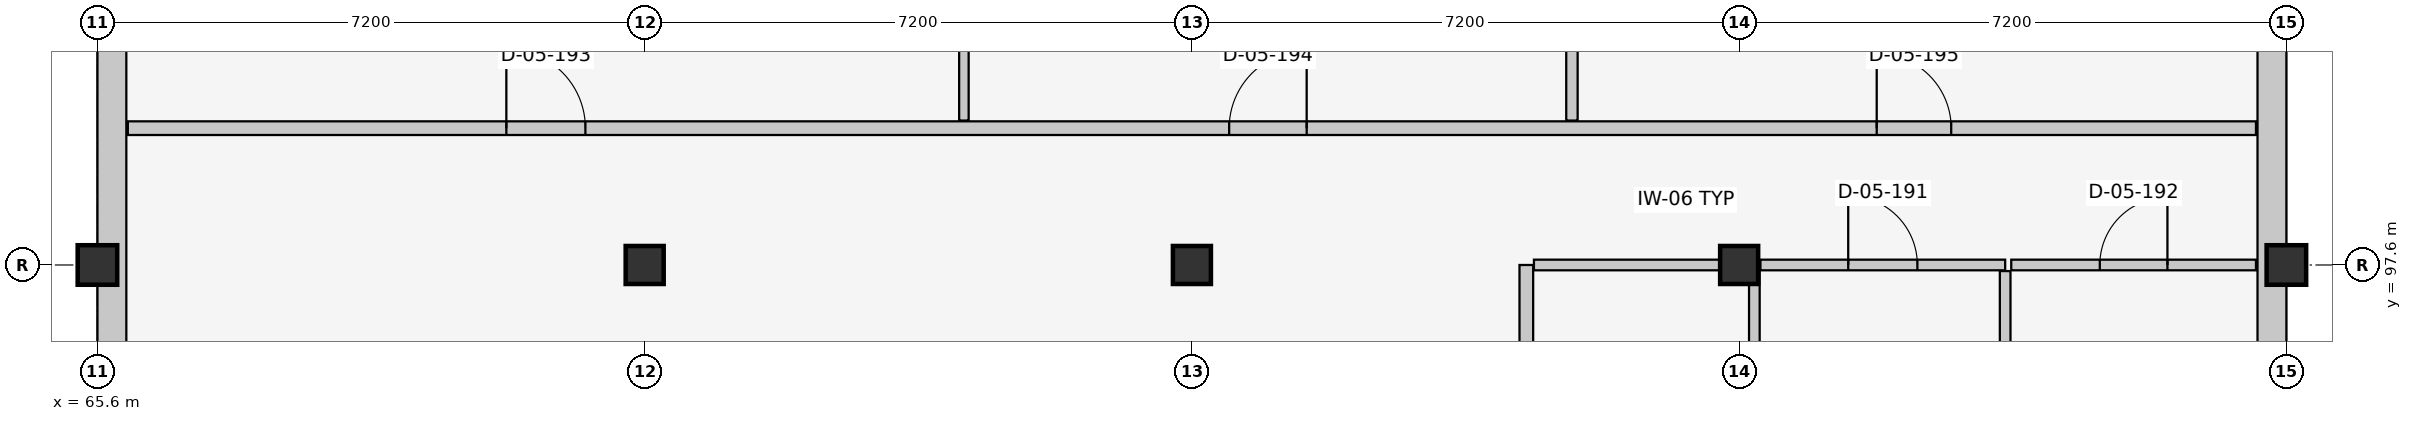
"""IFC4 building model, lengths in metres.
Left out: names, types, materials, properties, quantities, classifications, styles, units other than length and angle.
Written with IfcOpenShell. Run it as: python <this file> out.ifc"""

import sys

from ifc_helpers import new_model, si_unit, direction, frame, frame_2d, origin, origin_2d, place, context, subcontext, project, spatial, rectangle, extrude, element, fill, save


model = new_model("IFC4")
c1 = context("Model", 3, precision=1e-05, world=origin(), true_north=direction((0.0, 1.0)))
c2 = subcontext(c1, "Body", "Model", "MODEL_VIEW")
j1 = project(units=[si_unit("LENGTHUNIT", "METRE"), si_unit("PLANEANGLEUNIT", "RADIAN")], contexts=[c1])
p1 = place(None, origin())
s1 = spatial("IfcSite", under=j1, at=p1, CompositionType="ELEMENT")
p2 = place(p1, origin())
s2 = spatial("IfcBuilding", under=s1, at=p2, CompositionType="ELEMENT")
p3 = place(p2, frame((0.0, 0.0, 21.9)))
s3 = spatial("IfcBuildingStorey", under=s2, at=p3, CompositionType="ELEMENT", Elevation=21.9)
p4 = place(p3, frame((65.6, 97.6, 0.0), z_axis=(0.0, 0.0, 1.0), x_axis=(1.0, 0.0, 0.0)))
e1 = element("IfcColumn", 1, at=p4, inside=s3, PredefinedType="COLUMN", context=c2, shape_type="SweptSolid", body=[
    extrude(rectangle(XDim=0.52, YDim=0.52, at=origin_2d()), origin(), (0.0, 0.0, 1.0), 3.9),
])
for number, where, z_axis, x_axis in (
    (2, (72.8, 97.6, 0.0), (0.0, 0.0, 1.0), (1.0, 0.0, 0.0)),
    (3, (80.0, 97.6, 0.0), (0.0, 0.0, 1.0), (1.0, 0.0, 0.0)),
    (4, (87.2, 97.6, 0.0), (0.0, 0.0, 1.0), (1.0, 0.0, 0.0)),
):
    element("IfcColumn", number, at=place(p3, frame(where, z_axis=z_axis, x_axis=x_axis)), inside=s3, PredefinedType="COLUMN", context=c2, shape_type="SweptSolid", body=[
        extrude(rectangle(XDim=0.5, YDim=0.5, at=origin_2d()), origin(), (0.0, 0.0, 1.0), 3.9),
    ])
p5 = place(p3, frame((94.4, 97.6, 0.0), z_axis=(0.0, 0.0, 1.0), x_axis=(1.0, 0.0, 0.0)))
e5 = element("IfcColumn", 5, at=p5, inside=s3, PredefinedType="COLUMN", context=c2, shape_type="SweptSolid", body=[
    extrude(rectangle(XDim=0.52, YDim=0.52, at=origin_2d()), origin(), (0.0, 0.0, 1.0), 3.9),
])
p6 = place(p3, frame((94.21, 104.8, 0.0), z_axis=(0.0, 0.0, 1.0), x_axis=(0.0, -1.0, 0.0)))
e6 = element("IfcWall", 6, at=p6, inside=s3, PredefinedType="SOLIDWALL", context=c2, shape_type="SweptSolid", body=[
    extrude(rectangle(XDim=14.4, YDim=0.38, at=frame_2d((7.2, 0.0))), origin(), (0.0, 0.0, 1.0), 2.915),
])
p7 = place(p6, frame((1.275, 0.0, 0.9)))
e7 = element("IfcOpeningElement", 7, at=p7, cuts=e6, PredefinedType="OPENING", context=c2, shape_type="SweptSolid", body=[
    extrude(rectangle(XDim=1.05, YDim=1.45, at=frame_2d((0.525, 0.725))), frame((0.0, 0.202, 0.0), z_axis=(0.0, -1.0, 0.0), x_axis=(1.0, 0.0, 0.0)), (0.0, 0.0, 1.0), 0.404),
])
p8 = place(p6, frame((8.375, 0.0, 0.9)))
e8 = element("IfcOpeningElement", 8, at=p8, cuts=e6, PredefinedType="OPENING", context=c2, shape_type="SweptSolid", body=[
    extrude(rectangle(XDim=1.25, YDim=1.45, at=frame_2d((0.625, 0.725))), frame((0.0, 0.202, 0.0), z_axis=(0.0, -1.0, 0.0), x_axis=(1.0, 0.0, 0.0)), (0.0, 0.0, 1.0), 0.404),
])
p9 = place(p6, frame((11.925, 0.0, 0.9)))
e9 = element("IfcOpeningElement", 9, at=p9, cuts=e6, PredefinedType="OPENING", context=c2, shape_type="SweptSolid", body=[
    extrude(rectangle(XDim=1.35, YDim=1.45, at=frame_2d((0.675, 0.725))), frame((0.0, 0.202, 0.0), z_axis=(0.0, -1.0, 0.0), x_axis=(1.0, 0.0, 0.0)), (0.0, 0.0, 1.0), 0.404),
])
p10 = place(p3, frame((65.79, 90.4, 0.0), z_axis=(0.0, 0.0, 1.0), x_axis=(0.0, 1.0, 0.0)))
e10 = element("IfcWall", 10, at=p10, inside=s3, PredefinedType="SOLIDWALL", context=c2, shape_type="SweptSolid", body=[
    extrude(rectangle(XDim=14.4, YDim=0.38, at=frame_2d((7.2, 0.0))), origin(), (0.0, 0.0, 1.0), 2.915),
])
p11 = place(p10, frame((1.24, 0.0, 0.9)))
e11 = element("IfcOpeningElement", 11, at=p11, cuts=e10, PredefinedType="OPENING", context=c2, shape_type="SweptSolid", body=[
    extrude(rectangle(XDim=1.12, YDim=1.75, at=frame_2d((0.56, 0.875))), frame((0.0, 0.202, 0.0), z_axis=(0.0, -1.0, 0.0), x_axis=(1.0, 0.0, 0.0)), (0.0, 0.0, 1.0), 0.404),
])
p12 = place(p10, frame((4.78, 0.0, 0.9)))
e12 = element("IfcOpeningElement", 12, at=p12, cuts=e10, PredefinedType="OPENING", context=c2, shape_type="SweptSolid", body=[
    extrude(rectangle(XDim=1.24, YDim=1.75, at=frame_2d((0.62, 0.875))), frame((0.0, 0.202, 0.0), z_axis=(0.0, -1.0, 0.0), x_axis=(1.0, 0.0, 0.0)), (0.0, 0.0, 1.0), 0.404),
])
p13 = place(p10, frame((11.88, 0.0, 0.9)))
e13 = element("IfcOpeningElement", 13, at=p13, cuts=e10, PredefinedType="OPENING", context=c2, shape_type="SweptSolid", body=[
    extrude(rectangle(XDim=1.44, YDim=1.75, at=frame_2d((0.72, 0.875))), frame((0.0, 0.202, 0.0), z_axis=(0.0, -1.0, 0.0), x_axis=(1.0, 0.0, 0.0)), (0.0, 0.0, 1.0), 0.404),
])
p14 = place(p3, frame((66.0, 99.4, 0.0), z_axis=(0.0, 0.0, 1.0), x_axis=(1.0, 0.0, 0.0)))
e14 = element("IfcWall", 14, at=p14, inside=s3, PredefinedType="PARTITIONING", context=c2, shape_type="SweptSolid", body=[
    extrude(rectangle(XDim=28.0, YDim=0.18, at=frame_2d((14.0, 0.0))), origin(), (0.0, 0.0, 1.0), 3.66),
])
p15 = place(p14, frame((4.98, 0.0, 0.0)))
e15 = element("IfcOpeningElement", 15, at=p15, cuts=e14, PredefinedType="OPENING", context=c2, shape_type="SweptSolid", body=[
    extrude(rectangle(XDim=1.04, YDim=2.15, at=frame_2d((0.52, 1.075))), frame((0.0, 0.102, 0.0), z_axis=(0.0, -1.0, 0.0), x_axis=(1.0, 0.0, 0.0)), (0.0, 0.0, 1.0), 0.204),
])
p16 = place(p14, frame((14.49, 0.0, 0.0)))
e16 = element("IfcOpeningElement", 16, at=p16, cuts=e14, PredefinedType="OPENING", context=c2, shape_type="SweptSolid", body=[
    extrude(rectangle(XDim=1.02, YDim=2.12, at=frame_2d((0.51, 1.06))), frame((0.0, 0.102, 0.0), z_axis=(0.0, -1.0, 0.0), x_axis=(1.0, 0.0, 0.0)), (0.0, 0.0, 1.0), 0.204),
])
p17 = place(p14, frame((23.01, 0.0, 0.0)))
e17 = element("IfcOpeningElement", 17, at=p17, cuts=e14, PredefinedType="OPENING", context=c2, shape_type="SweptSolid", body=[
    extrude(rectangle(XDim=0.98, YDim=2.12, at=frame_2d((0.49, 1.06))), frame((0.0, 0.102, 0.0), z_axis=(0.0, -1.0, 0.0), x_axis=(1.0, 0.0, 0.0)), (0.0, 0.0, 1.0), 0.204),
])
p18 = place(p3, frame((84.4, 94.0, 0.0), z_axis=(0.0, 0.0, 1.0), x_axis=(0.0, 1.0, 0.0)))
e18 = element("IfcWall", 18, at=p18, inside=s3, PredefinedType="PARTITIONING", context=c2, shape_type="SweptSolid", body=[
    extrude(rectangle(XDim=3.6, YDim=0.18, at=frame_2d((1.8, 0.0))), origin(), (0.0, 0.0, 1.0), 3.66),
])
p19 = place(p18, frame((1.3, 0.0, 0.0)))
e19 = element("IfcOpeningElement", 19, at=p19, cuts=e18, PredefinedType="OPENING", context=c2, shape_type="SweptSolid", body=[
    extrude(rectangle(XDim=1.0, YDim=2.1, at=frame_2d((0.5, 1.05))), frame((0.0, 0.102, 0.0), z_axis=(0.0, -1.0, 0.0), x_axis=(1.0, 0.0, 0.0)), (0.0, 0.0, 1.0), 0.204),
])
p20 = place(p3, frame((84.5, 97.6, 0.0), z_axis=(0.0, 0.0, 1.0), x_axis=(1.0, 0.0, 0.0)))
e20 = element("IfcWall", 20, at=p20, inside=s3, PredefinedType="PARTITIONING", context=c2, shape_type="SweptSolid", body=[
    extrude(rectangle(XDim=2.9, YDim=0.14, at=frame_2d((1.45, 0.0))), origin(), (0.0, 0.0, 1.0), 2.985),
])
p21 = place(p3, frame((87.4, 90.8, 0.0), z_axis=(0.0, 0.0, 1.0), x_axis=(0.0, 1.0, 0.0)))
e21 = element("IfcWall", 21, at=p21, inside=s3, PredefinedType="PARTITIONING", context=c2, shape_type="SweptSolid", body=[
    extrude(rectangle(XDim=6.72, YDim=0.14, at=frame_2d((3.36, 0.0))), origin(), (0.0, 0.0, 1.0), 3.035),
])
p22 = place(p3, frame((87.48, 97.6, 0.0), z_axis=(0.0, 0.0, 1.0), x_axis=(1.0, 0.0, 0.0)))
e22 = element("IfcWall", 22, at=p22, inside=s3, PredefinedType="PARTITIONING", context=c2, shape_type="SweptSolid", body=[
    extrude(rectangle(XDim=3.22, YDim=0.14, at=frame_2d((1.61, 0.0))), origin(), (0.0, 0.0, 1.0), 2.935),
])
p23 = place(p22, frame((1.155, 0.0, 0.0)))
e23 = element("IfcOpeningElement", 23, at=p23, cuts=e22, PredefinedType="OPENING", context=c2, shape_type="SweptSolid", body=[
    extrude(rectangle(XDim=0.91, YDim=2.06, at=frame_2d((0.455, 1.03))), frame((0.0, 0.082, 0.0), z_axis=(0.0, -1.0, 0.0), x_axis=(1.0, 0.0, 0.0)), (0.0, 0.0, 1.0), 0.164),
])
p24 = place(p3, frame((90.7, 90.8, 0.0), z_axis=(0.0, 0.0, 1.0), x_axis=(0.0, 1.0, 0.0)))
e24 = element("IfcWall", 24, at=p24, inside=s3, PredefinedType="PARTITIONING", context=c2, shape_type="SweptSolid", body=[
    extrude(rectangle(XDim=6.72, YDim=0.14, at=frame_2d((3.36, 0.0))), origin(), (0.0, 0.0, 1.0), 3.405),
])
p25 = place(p3, frame((90.78, 97.6, 0.0), z_axis=(0.0, 0.0, 1.0), x_axis=(1.0, 0.0, 0.0)))
e25 = element("IfcWall", 25, at=p25, inside=s3, PredefinedType="PARTITIONING", context=c2, shape_type="SweptSolid", body=[
    extrude(rectangle(XDim=3.22, YDim=0.14, at=frame_2d((1.61, 0.0))), origin(), (0.0, 0.0, 1.0), 2.935),
])
p26 = place(p25, frame((1.165, 0.0, 0.0)))
e26 = element("IfcOpeningElement", 26, at=p26, cuts=e25, PredefinedType="OPENING", context=c2, shape_type="SweptSolid", body=[
    extrude(rectangle(XDim=0.89, YDim=2.05, at=frame_2d((0.445, 1.025))), frame((0.0, 0.082, 0.0), z_axis=(0.0, -1.0, 0.0), x_axis=(1.0, 0.0, 0.0)), (0.0, 0.0, 1.0), 0.164),
])
p27 = place(p3, frame((77.0, 99.5, 0.0), z_axis=(0.0, 0.0, 1.0), x_axis=(0.0, 1.0, 0.0)))
e27 = element("IfcWall", 27, at=p27, inside=s3, PredefinedType="PARTITIONING", context=c2, shape_type="SweptSolid", body=[
    extrude(rectangle(XDim=4.9, YDim=0.125, at=frame_2d((2.45, 0.0))), origin(), (0.0, 0.0, 1.0), 3.66),
])
p28 = place(p3, frame((85.0, 99.5, 0.0), z_axis=(0.0, 0.0, 1.0), x_axis=(0.0, 1.0, 0.0)))
e28 = element("IfcWall", 28, at=p28, inside=s3, PredefinedType="PARTITIONING", context=c2, shape_type="SweptSolid", body=[
    extrude(rectangle(XDim=4.9, YDim=0.15, at=frame_2d((2.45, 0.0))), origin(), (0.0, 0.0, 1.0), 3.66),
])
p29 = place(p23, origin())
e29 = element("IfcDoor", 29, at=p29, inside=s3, OperationType="SINGLE_SWING_LEFT", PredefinedType="DOOR", context=c2, shape_type="SweptSolid", body=[
    extrude(rectangle(XDim=0.91, YDim=2.06, at=frame_2d((0.455, 1.03))), frame((0.0, 0.025, 0.0), z_axis=(0.0, -1.0, 0.0), x_axis=(1.0, 0.0, 0.0)), (0.0, 0.0, 1.0), 0.05),
])
fill(e23, e29)
p30 = place(p26, origin())
e30 = element("IfcDoor", 30, at=p30, inside=s3, OperationType="SINGLE_SWING_RIGHT", PredefinedType="DOOR", context=c2, shape_type="SweptSolid", body=[
    extrude(rectangle(XDim=0.89, YDim=2.05, at=frame_2d((0.445, 1.025))), frame((0.0, 0.025, 0.0), z_axis=(0.0, -1.0, 0.0), x_axis=(1.0, 0.0, 0.0)), (0.0, 0.0, 1.0), 0.05),
])
fill(e26, e30)
p31 = place(p15, origin())
e31 = element("IfcDoor", 31, at=p31, inside=s3, OperationType="SINGLE_SWING_LEFT", PredefinedType="DOOR", context=c2, shape_type="SweptSolid", body=[
    extrude(rectangle(XDim=1.04, YDim=2.15, at=frame_2d((0.52, 1.075))), frame((0.0, 0.025, 0.0), z_axis=(0.0, -1.0, 0.0), x_axis=(1.0, 0.0, 0.0)), (0.0, 0.0, 1.0), 0.05),
])
fill(e15, e31)
p32 = place(p16, origin())
e32 = element("IfcDoor", 32, at=p32, inside=s3, OperationType="SINGLE_SWING_RIGHT", PredefinedType="DOOR", context=c2, shape_type="SweptSolid", body=[
    extrude(rectangle(XDim=1.02, YDim=2.12, at=frame_2d((0.51, 1.06))), frame((0.0, 0.025, 0.0), z_axis=(0.0, -1.0, 0.0), x_axis=(1.0, 0.0, 0.0)), (0.0, 0.0, 1.0), 0.05),
])
fill(e16, e32)
p33 = place(p17, origin())
e33 = element("IfcDoor", 33, at=p33, inside=s3, OperationType="SINGLE_SWING_LEFT", PredefinedType="DOOR", context=c2, shape_type="SweptSolid", body=[
    extrude(rectangle(XDim=0.98, YDim=2.12, at=frame_2d((0.49, 1.06))), frame((0.0, 0.025, 0.0), z_axis=(0.0, -1.0, 0.0), x_axis=(1.0, 0.0, 0.0)), (0.0, 0.0, 1.0), 0.05),
])
fill(e17, e33)
save(model, sys.argv[1])
